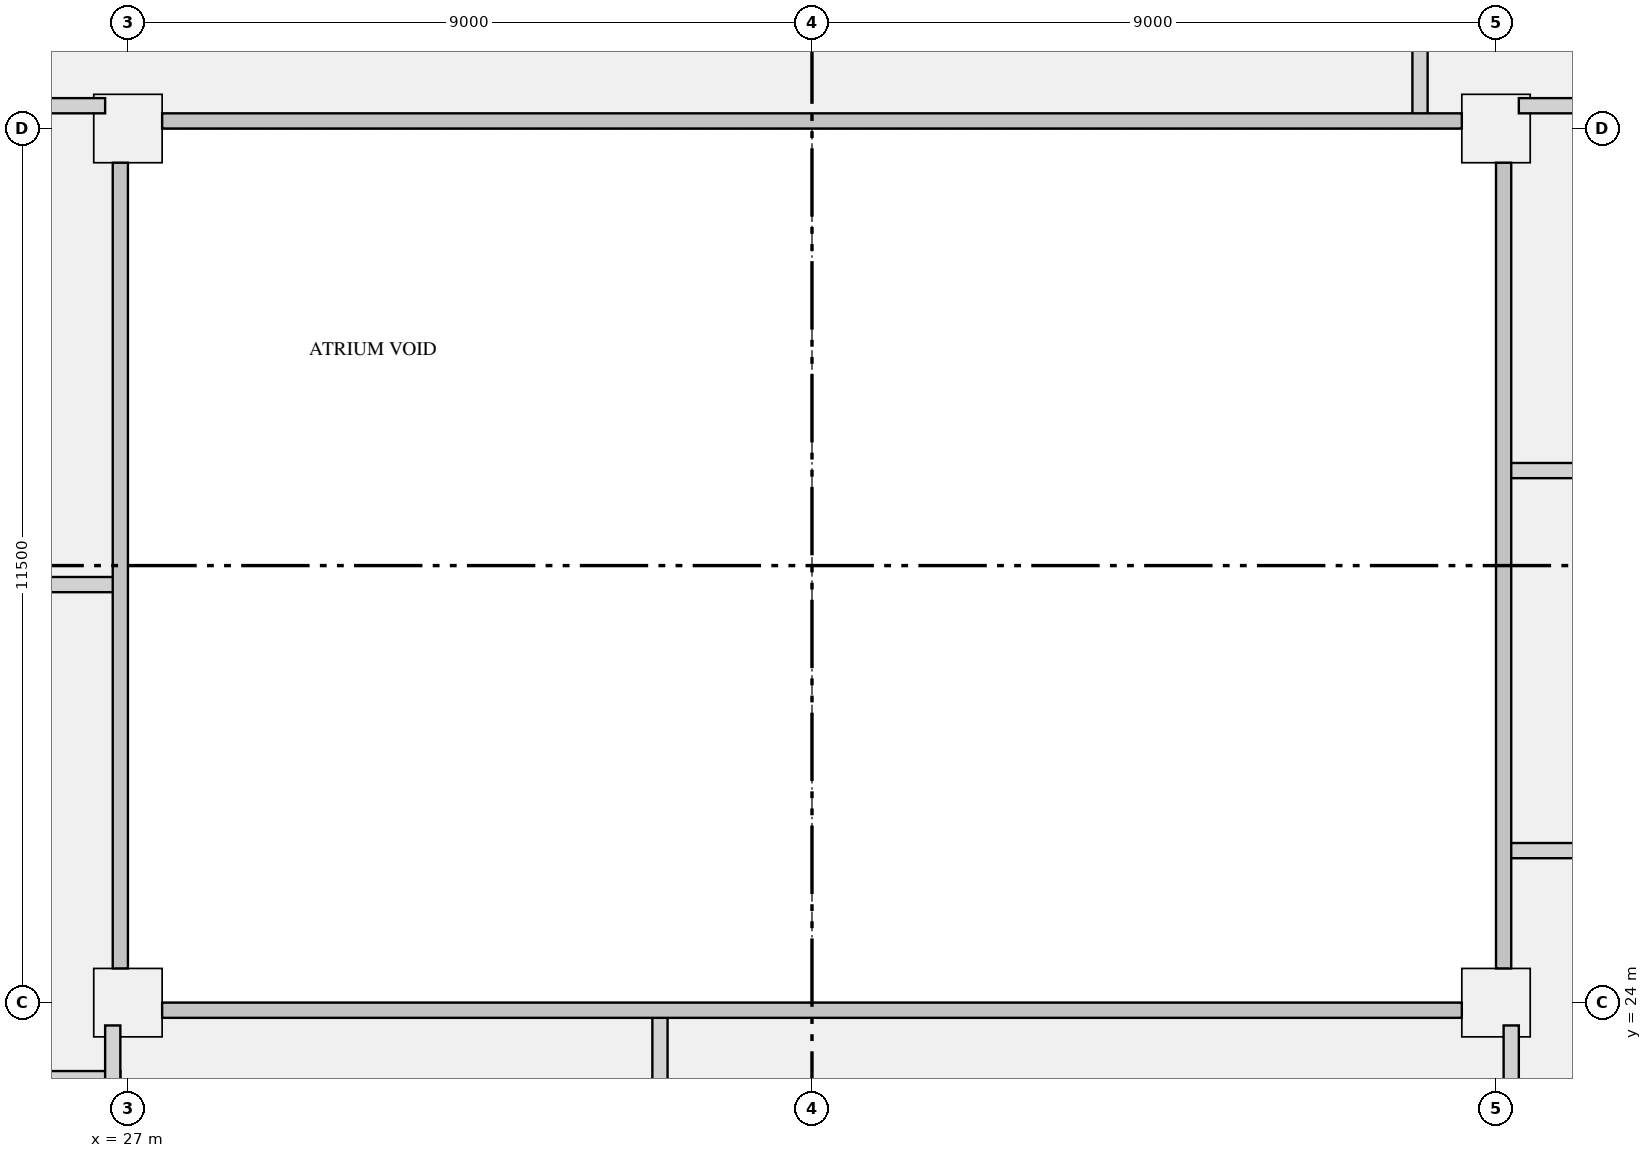
"""IFC4 building model, lengths in metres.
Left out: names, types, materials, properties, quantities, classifications, styles, units other than length and angle.
Written with IfcOpenShell. Run it as: python <this file> out.ifc"""

import sys

from ifc_helpers import new_model, si_unit, direction, frame, frame_2d, origin, origin_2d, place, context, subcontext, project, spatial, rectangle, extrude, element, save


model = new_model("IFC4")
c1 = context("Model", 3, precision=1e-05, world=origin(), true_north=direction((0.0, 1.0)))
c2 = subcontext(c1, "Body", "Model", "MODEL_VIEW")
j1 = project(units=[si_unit("LENGTHUNIT", "METRE"), si_unit("PLANEANGLEUNIT", "RADIAN")], contexts=[c1])
p1 = place(None, origin())
s1 = spatial("IfcSite", under=j1, at=p1, CompositionType="ELEMENT")
p2 = place(p1, origin())
s2 = spatial("IfcBuilding", under=s1, at=p2, CompositionType="ELEMENT")
p3 = place(p2, frame((0.0, 0.0, 235.8)))
s3 = spatial("IfcBuildingStorey", under=s2, at=p3, CompositionType="ELEMENT", Elevation=235.8)
for number, where, z_axis, x_axis in (
    (1, (27.0, 24.0, 0.0), (0.0, 0.0, 1.0), (1.0, 0.0, 0.0)),
    (2, (45.0, 24.0, 0.0), (0.0, 0.0, 1.0), (1.0, 0.0, 0.0)),
    (3, (27.0, 35.5, 0.0), (0.0, 0.0, 1.0), (1.0, 0.0, 0.0)),
    (4, (45.0, 35.5, 0.0), (0.0, 0.0, 1.0), (1.0, 0.0, 0.0)),
):
    element("IfcColumn", number, at=place(p3, frame(where, z_axis=z_axis, x_axis=x_axis)), inside=s3, PredefinedType="COLUMN", context=c2, shape_type="SweptSolid", body=[
        extrude(rectangle(XDim=0.9, YDim=0.9, at=origin_2d()), origin(), (0.0, 0.0, 1.0), 4.2),
    ])
p4 = place(p3, frame((19.425, 23.0, 0.0), z_axis=(0.0, 0.0, 1.0), x_axis=(1.0, 0.0, 0.0)))
e5 = element("IfcWall", 5, at=p4, inside=s3, PredefinedType="PARTITIONING", context=c2, shape_type="SweptSolid", body=[
    extrude(rectangle(XDim=7.475, YDim=0.2, at=frame_2d((3.737, 0.0))), origin(), (0.0, 0.0, 1.0), 3.85),
])
for number, where, z_axis, x_axis in (
    (6, (45.096, 26.0, 0.0), (0.0, 0.0, 1.0), (1.0, 0.0, 0.0)),
    (7, (19.4, 29.5, 0.0), (0.0, 0.0, 1.0), (1.0, 0.0, 0.0)),
    (8, (45.096, 31.0, 0.0), (0.0, 0.0, 1.0), (1.0, 0.0, 0.0)),
):
    element("IfcWall", number, at=place(p3, frame(where, z_axis=z_axis, x_axis=x_axis)), inside=s3, PredefinedType="PARTITIONING", context=c2, shape_type="SweptSolid", body=[
        extrude(rectangle(XDim=7.504, YDim=0.2, at=frame_2d((3.752, 0.0))), origin(), (0.0, 0.0, 1.0), 3.85),
    ])
p5 = place(p3, frame((19.4, 35.8, 0.0), z_axis=(0.0, 0.0, 1.0), x_axis=(1.0, 0.0, 0.0)))
e9 = element("IfcWall", 9, at=p5, inside=s3, PredefinedType="PARTITIONING", context=c2, shape_type="SweptSolid", body=[
    extrude(rectangle(XDim=7.3, YDim=0.2, at=frame_2d((3.65, 0.0))), origin(), (0.0, 0.0, 1.0), 3.85),
])
p6 = place(p3, frame((45.3, 35.8, 0.0), z_axis=(0.0, 0.0, 1.0), x_axis=(1.0, 0.0, 0.0)))
e10 = element("IfcWall", 10, at=p6, inside=s3, PredefinedType="PARTITIONING", context=c2, shape_type="SweptSolid", body=[
    extrude(rectangle(XDim=7.275, YDim=0.2, at=frame_2d((3.637, 0.0))), origin(), (0.0, 0.0, 1.0), 3.85),
])
p7 = place(p3, frame((26.8, 18.6, 0.0), z_axis=(0.0, 0.0, 1.0), x_axis=(0.0, 1.0, 0.0)))
e11 = element("IfcWall", 11, at=p7, inside=s3, PredefinedType="PARTITIONING", context=c2, shape_type="SweptSolid", body=[
    extrude(rectangle(XDim=5.1, YDim=0.2, at=frame_2d((2.55, 0.0))), origin(), (0.0, 0.0, 1.0), 3.85),
])
p8 = place(p3, frame((34.0, 18.6, 0.0), z_axis=(0.0, 0.0, 1.0), x_axis=(0.0, 1.0, 0.0)))
e12 = element("IfcWall", 12, at=p8, inside=s3, PredefinedType="PARTITIONING", context=c2, shape_type="SweptSolid", body=[
    extrude(rectangle(XDim=5.304, YDim=0.2, at=frame_2d((2.652, 0.0))), origin(), (0.0, 0.0, 1.0), 3.85),
])
p9 = place(p3, frame((45.2, 18.6, 0.0), z_axis=(0.0, 0.0, 1.0), x_axis=(0.0, 1.0, 0.0)))
e13 = element("IfcWall", 13, at=p9, inside=s3, PredefinedType="PARTITIONING", context=c2, shape_type="SweptSolid", body=[
    extrude(rectangle(XDim=5.1, YDim=0.2, at=frame_2d((2.55, 0.0))), origin(), (0.0, 0.0, 1.0), 3.85),
])
p10 = place(p3, frame((44.0, 35.596, 0.0), z_axis=(0.0, 0.0, 1.0), x_axis=(0.0, 1.0, 0.0)))
e14 = element("IfcWall", 14, at=p10, inside=s3, PredefinedType="PARTITIONING", context=c2, shape_type="SweptSolid", body=[
    extrude(rectangle(XDim=2.754, YDim=0.2, at=frame_2d((1.377, 0.0))), origin(), (0.0, 0.0, 1.0), 3.85),
])
save(model, sys.argv[1])
